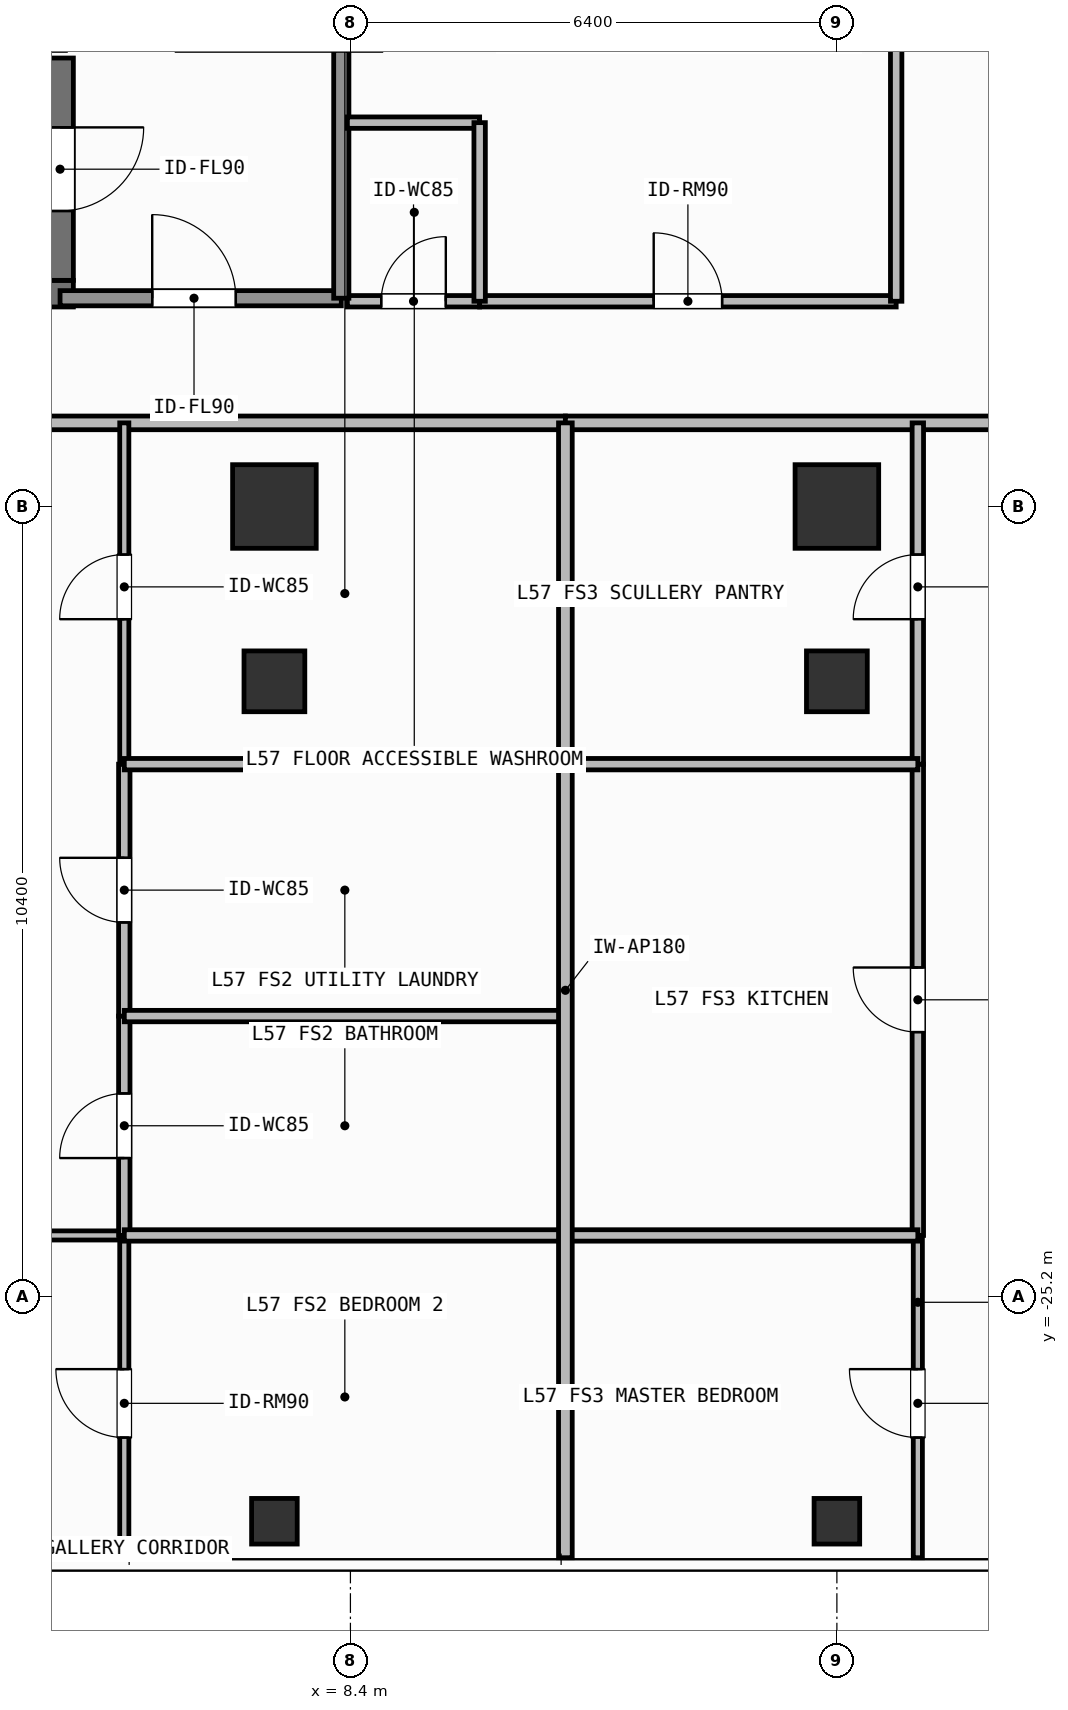
"""IFC4 building model, lengths in metres.
Left out: names, types, materials, properties, quantities, classifications, styles, units other than length and angle.
Written with IfcOpenShell. Run it as: python <this file> out.ifc"""

import sys

from ifc_helpers import new_model, si_unit, direction, frame, frame_2d, origin, origin_2d, place, context, subcontext, project, spatial, rectangle, hollow_rectangle, extrude, element, fill, save


model = new_model("IFC4")
c1 = context("Model", 3, precision=1e-05, world=origin(), true_north=direction((0.0, 1.0)))
c2 = subcontext(c1, "Body", "Model", "MODEL_VIEW")
j1 = project(units=[si_unit("LENGTHUNIT", "METRE"), si_unit("PLANEANGLEUNIT", "RADIAN")], contexts=[c1])
p1 = place(None, origin())
s1 = spatial("IfcSite", under=j1, at=p1, CompositionType="ELEMENT")
p2 = place(p1, origin())
s2 = spatial("IfcBuilding", under=s1, at=p2, CompositionType="ELEMENT")
p3 = place(p2, frame((0.0, 0.0, 231.3)))
s3 = spatial("IfcBuildingStorey", under=s2, at=p3, CompositionType="ELEMENT", Elevation=231.3)
p4 = place(p3, frame((-2.555, -12.0, 0.0), z_axis=(0.0, 0.0, 1.0), x_axis=(1.0, 0.0, 0.0)))
e1 = element("IfcWall", 1, at=p4, inside=s3, PredefinedType="SHEAR", context=c2, shape_type="SweptSolid", body=[
    extrude(rectangle(XDim=7.31, YDim=0.35, at=frame_2d((3.655, 0.0))), origin(), (0.0, 0.0, 1.0), 3.9),
])
p5 = place(p3, frame((4.58, -8.9, 0.0), z_axis=(0.0, 0.0, 1.0), x_axis=(0.0, -1.0, 0.0)))
e2 = element("IfcWall", 2, at=p5, inside=s3, PredefinedType="SHEAR", context=c2, shape_type="SweptSolid", body=[
    extrude(rectangle(XDim=2.925, YDim=0.35, at=frame_2d((1.462, 0.0))), origin(), (0.0, 0.0, 1.0), 3.9),
])
p6 = place(p5, frame((0.913, 0.0, 0.0)))
e3 = element("IfcOpeningElement", 3, at=p6, cuts=e2, PredefinedType="OPENING", context=c2, shape_type="SweptSolid", body=[
    extrude(rectangle(XDim=1.1, YDim=2.15, at=frame_2d((0.55, 1.075))), frame((0.0, 0.185, 0.0), z_axis=(0.0, -1.0, 0.0), x_axis=(1.0, 0.0, 0.0)), (0.0, 0.0, 1.0), 0.37),
])
for number, where, z_axis, x_axis in (
    (4, (7.4, -14.8, 0.0), (0.0, 0.0, 1.0), (1.0, 0.0, 0.0)),
    (5, (14.8, -14.8, 0.0), (0.0, 0.0, 1.0), (1.0, 0.0, 0.0)),
):
    element("IfcColumn", number, at=place(p3, frame(where, z_axis=z_axis, x_axis=x_axis)), inside=s3, PredefinedType="COLUMN", context=c2, shape_type="SweptSolid", body=[
        extrude(rectangle(XDim=1.1, YDim=1.1, at=origin_2d()), origin(), (0.0, 0.0, 1.0), 3.9),
    ])
for number, where, z_axis, x_axis in (
    (6, (7.4, -17.1, 0.0), (0.0, 0.0, 1.0), (1.0, 0.0, 0.0)),
    (7, (14.8, -17.1, 0.0), (0.0, 0.0, 1.0), (1.0, 0.0, 0.0)),
):
    element("IfcColumn", number, at=place(p3, frame(where, z_axis=z_axis, x_axis=x_axis)), inside=s3, PredefinedType="COLUMN", context=c2, shape_type="SweptSolid", body=[
        extrude(hollow_rectangle(XDim=0.8, YDim=0.8, WallThickness=0.036, at=origin_2d()), origin(), (0.0, 0.0, 1.0), 3.9),
    ])
for number, where, z_axis, x_axis in (
    (8, (7.4, -28.15, 0.0), (0.0, 0.0, 1.0), (1.0, 0.0, 0.0)),
    (9, (14.8, -28.15, 0.0), (0.0, 0.0, 1.0), (1.0, 0.0, 0.0)),
):
    element("IfcColumn", number, at=place(p3, frame(where, z_axis=z_axis, x_axis=x_axis)), inside=s3, PredefinedType="COLUMN", context=c2, shape_type="SweptSolid", body=[
        extrude(hollow_rectangle(XDim=0.6, YDim=0.6, WallThickness=0.028, at=origin_2d()), origin(), (0.0, 0.0, 1.0), 3.9),
    ])
p7 = place(p3, frame((4.58, -12.06, 0.0), z_axis=(0.0, 0.0, 1.0), x_axis=(1.0, 0.0, 0.0)))
e10 = element("IfcWall", 10, at=p7, inside=s3, PredefinedType="SOLIDWALL", context=c2, shape_type="SweptSolid", body=[
    extrude(rectangle(XDim=3.7, YDim=0.2, at=frame_2d((1.85, 0.0))), origin(), (0.0, 0.0, 1.0), 3.6),
])
p8 = place(p7, frame((1.212, 0.0, 0.0)))
e11 = element("IfcOpeningElement", 11, at=p8, cuts=e10, PredefinedType="OPENING", context=c2, shape_type="SweptSolid", body=[
    extrude(rectangle(XDim=1.1, YDim=2.15, at=frame_2d((0.55, 1.075))), frame((0.0, 0.11, 0.0), z_axis=(0.0, -1.0, 0.0), x_axis=(1.0, 0.0, 0.0)), (0.0, 0.0, 1.0), 0.22),
])
p9 = place(p3, frame((8.36, -12.1, 0.0), z_axis=(0.0, 0.0, 1.0), x_axis=(1.0, 0.0, 0.0)))
e12 = element("IfcWall", 12, at=p9, inside=s3, PredefinedType="PARTITIONING", context=c2, shape_type="SweptSolid", body=[
    extrude(rectangle(XDim=1.74, YDim=0.15, at=frame_2d((0.87, 0.0))), origin(), (0.0, 0.0, 1.0), 3.6),
])
p10 = place(p9, frame((0.445, 0.0, 0.0)))
e13 = element("IfcOpeningElement", 13, at=p10, cuts=e12, PredefinedType="OPENING", context=c2, shape_type="SweptSolid", body=[
    extrude(rectangle(XDim=0.85, YDim=2.1, at=frame_2d((0.425, 1.05))), frame((0.0, 0.085, 0.0), z_axis=(0.0, -1.0, 0.0), x_axis=(1.0, 0.0, 0.0)), (0.0, 0.0, 1.0), 0.17),
])
p11 = place(p3, frame((10.1, -12.1, 0.0), z_axis=(0.0, 0.0, 1.0), x_axis=(1.0, 0.0, 0.0)))
e14 = element("IfcWall", 14, at=p11, inside=s3, PredefinedType="PARTITIONING", context=c2, shape_type="SweptSolid", body=[
    extrude(rectangle(XDim=5.48, YDim=0.15, at=frame_2d((2.74, 0.0))), origin(), (0.0, 0.0, 1.0), 3.6),
])
p12 = place(p11, frame((2.29, 0.0, 0.0)))
e15 = element("IfcOpeningElement", 15, at=p12, cuts=e14, PredefinedType="OPENING", context=c2, shape_type="SweptSolid", body=[
    extrude(rectangle(XDim=0.9, YDim=2.1, at=frame_2d((0.45, 1.05))), frame((0.0, 0.085, 0.0), z_axis=(0.0, -1.0, 0.0), x_axis=(1.0, 0.0, 0.0)), (0.0, 0.0, 1.0), 0.17),
])
p13 = place(p3, frame((-4.677, -13.7, 0.0), z_axis=(0.0, 0.0, 1.0), x_axis=(1.0, 0.0, 0.0)))
e16 = element("IfcWall", 16, at=p13, inside=s3, PredefinedType="PARTITIONING", context=c2, shape_type="SweptSolid", body=[
    extrude(rectangle(XDim=15.905, YDim=0.18, at=frame_2d((7.953, 0.0))), origin(), (0.0, 0.0, 1.0), 3.6),
])
p14 = place(p13, frame((6.03, 0.0, 0.0)))
e17 = element("IfcOpeningElement", 17, at=p14, cuts=e16, PredefinedType="OPENING", context=c2, shape_type="SweptSolid", body=[
    extrude(rectangle(XDim=1.0, YDim=2.2, at=frame_2d((0.5, 1.1))), frame((0.0, 0.1, 0.0), z_axis=(0.0, -1.0, 0.0), x_axis=(1.0, 0.0, 0.0)), (0.0, 0.0, 1.0), 0.2),
])
p15 = place(p3, frame((-1.827, -24.39, 0.0), z_axis=(0.0, 0.0, 1.0), x_axis=(1.0, 0.0, 0.0)))
e18 = element("IfcWall", 18, at=p15, inside=s3, PredefinedType="PARTITIONING", context=c2, shape_type="SweptSolid", body=[
    extrude(rectangle(XDim=7.252, YDim=0.12, at=frame_2d((3.626, 0.0))), origin(), (0.0, 0.0, 1.0), 3.6),
])
p16 = place(p15, frame((3.176, 0.0, 0.0)))
e19 = element("IfcOpeningElement", 19, at=p16, cuts=e18, PredefinedType="OPENING", context=c2, shape_type="SweptSolid", body=[
    extrude(rectangle(XDim=0.9, YDim=2.1, at=frame_2d((0.45, 1.05))), frame((0.0, 0.07, 0.0), z_axis=(0.0, -1.0, 0.0), x_axis=(1.0, 0.0, 0.0)), (0.0, 0.0, 1.0), 0.14),
])
p17 = place(p3, frame((5.425, -24.39, 0.0), z_axis=(0.0, 0.0, 1.0), x_axis=(0.0, 1.0, 0.0)))
e20 = element("IfcWall", 20, at=p17, inside=s3, PredefinedType="PARTITIONING", context=c2, shape_type="SweptSolid", body=[
    extrude(rectangle(XDim=2.886, YDim=0.15, at=frame_2d((1.443, 0.0))), origin(), (0.0, 0.0, 1.0), 3.6),
])
p18 = place(p17, frame((1.018, 0.0, 0.0)))
e21 = element("IfcOpeningElement", 21, at=p18, cuts=e20, PredefinedType="OPENING", context=c2, shape_type="SweptSolid", body=[
    extrude(rectangle(XDim=0.85, YDim=2.1, at=frame_2d((0.425, 1.05))), frame((0.0, 0.085, 0.0), z_axis=(0.0, -1.0, 0.0), x_axis=(1.0, 0.0, 0.0)), (0.0, 0.0, 1.0), 0.17),
])
p19 = place(p3, frame((5.425, -21.504, 0.0), z_axis=(0.0, 0.0, 1.0), x_axis=(0.0, 1.0, 0.0)))
e22 = element("IfcWall", 22, at=p19, inside=s3, PredefinedType="PARTITIONING", context=c2, shape_type="SweptSolid", body=[
    extrude(rectangle(XDim=3.314, YDim=0.15, at=frame_2d((1.657, 0.0))), origin(), (0.0, 0.0, 1.0), 3.6),
])
p20 = place(p19, frame((1.232, 0.0, 0.0)))
e23 = element("IfcOpeningElement", 23, at=p20, cuts=e22, PredefinedType="OPENING", context=c2, shape_type="SweptSolid", body=[
    extrude(rectangle(XDim=0.85, YDim=2.1, at=frame_2d((0.425, 1.05))), frame((0.0, 0.085, 0.0), z_axis=(0.0, -1.0, 0.0), x_axis=(1.0, 0.0, 0.0)), (0.0, 0.0, 1.0), 0.17),
])
p21 = place(p3, frame((5.425, -18.19, 0.0), z_axis=(0.0, 0.0, 1.0), x_axis=(0.0, 1.0, 0.0)))
e24 = element("IfcWall", 24, at=p21, inside=s3, PredefinedType="PARTITIONING", context=c2, shape_type="SweptSolid", body=[
    extrude(rectangle(XDim=4.49, YDim=0.12, at=frame_2d((2.245, 0.0))), origin(), (0.0, 0.0, 1.0), 3.6),
])
p22 = place(p21, frame((1.907, 0.0, 0.0)))
e25 = element("IfcOpeningElement", 25, at=p22, cuts=e24, PredefinedType="OPENING", context=c2, shape_type="SweptSolid", body=[
    extrude(rectangle(XDim=0.85, YDim=2.1, at=frame_2d((0.425, 1.05))), frame((0.0, 0.07, 0.0), z_axis=(0.0, -1.0, 0.0), x_axis=(1.0, 0.0, 0.0)), (0.0, 0.0, 1.0), 0.14),
])
p23 = place(p3, frame((5.425, -28.63, 0.0), z_axis=(0.0, 0.0, 1.0), x_axis=(0.0, 1.0, 0.0)))
e26 = element("IfcWall", 26, at=p23, inside=s3, PredefinedType="PARTITIONING", context=c2, shape_type="SweptSolid", body=[
    extrude(rectangle(XDim=4.24, YDim=0.12, at=frame_2d((2.12, 0.0))), origin(), (0.0, 0.0, 1.0), 3.6),
])
p24 = place(p23, frame((1.581, 0.0, 0.0)))
e27 = element("IfcOpeningElement", 27, at=p24, cuts=e26, PredefinedType="OPENING", context=c2, shape_type="SweptSolid", body=[
    extrude(rectangle(XDim=0.9, YDim=2.1, at=frame_2d((0.45, 1.05))), frame((0.0, 0.07, 0.0), z_axis=(0.0, -1.0, 0.0), x_axis=(1.0, 0.0, 0.0)), (0.0, 0.0, 1.0), 0.14),
])
p25 = place(p3, frame((11.228, -13.7, 0.0), z_axis=(0.0, 0.0, 1.0), x_axis=(1.0, 0.0, 0.0)))
e28 = element("IfcWall", 28, at=p25, inside=s3, PredefinedType="PARTITIONING", context=c2, shape_type="SweptSolid", body=[
    extrude(rectangle(XDim=11.592, YDim=0.18, at=frame_2d((5.796, 0.0))), origin(), (0.0, 0.0, 1.0), 3.6),
])
p26 = place(p25, frame((6.004, 0.0, 0.0)))
e29 = element("IfcOpeningElement", 29, at=p26, cuts=e28, PredefinedType="OPENING", context=c2, shape_type="SweptSolid", body=[
    extrude(rectangle(XDim=1.0, YDim=2.2, at=frame_2d((0.5, 1.1))), frame((0.0, 0.1, 0.0), z_axis=(0.0, -1.0, 0.0), x_axis=(1.0, 0.0, 0.0)), (0.0, 0.0, 1.0), 0.2),
])
p27 = place(p3, frame((15.865, -24.39, 0.0), z_axis=(0.0, 0.0, 1.0), x_axis=(0.0, 1.0, 0.0)))
e30 = element("IfcWall", 30, at=p27, inside=s3, PredefinedType="PARTITIONING", context=c2, shape_type="SweptSolid", body=[
    extrude(rectangle(XDim=6.2, YDim=0.15, at=frame_2d((3.1, 0.0))), origin(), (0.0, 0.0, 1.0), 3.6),
])
p28 = place(p27, frame((2.675, 0.0, 0.0)))
e31 = element("IfcOpeningElement", 31, at=p28, cuts=e30, PredefinedType="OPENING", context=c2, shape_type="SweptSolid", body=[
    extrude(rectangle(XDim=0.85, YDim=2.1, at=frame_2d((0.425, 1.05))), frame((0.0, 0.085, 0.0), z_axis=(0.0, -1.0, 0.0), x_axis=(1.0, 0.0, 0.0)), (0.0, 0.0, 1.0), 0.17),
])
p29 = place(p3, frame((15.865, -18.19, 0.0), z_axis=(0.0, 0.0, 1.0), x_axis=(0.0, 1.0, 0.0)))
e32 = element("IfcWall", 32, at=p29, inside=s3, PredefinedType="PARTITIONING", context=c2, shape_type="SweptSolid", body=[
    extrude(rectangle(XDim=4.49, YDim=0.15, at=frame_2d((2.245, 0.0))), origin(), (0.0, 0.0, 1.0), 3.6),
])
p30 = place(p29, frame((1.907, 0.0, 0.0)))
e33 = element("IfcOpeningElement", 33, at=p30, cuts=e32, PredefinedType="OPENING", context=c2, shape_type="SweptSolid", body=[
    extrude(rectangle(XDim=0.85, YDim=2.1, at=frame_2d((0.425, 1.05))), frame((0.0, 0.085, 0.0), z_axis=(0.0, -1.0, 0.0), x_axis=(1.0, 0.0, 0.0)), (0.0, 0.0, 1.0), 0.17),
])
p31 = place(p3, frame((15.865, -28.63, 0.0), z_axis=(0.0, 0.0, 1.0), x_axis=(0.0, 1.0, 0.0)))
e34 = element("IfcWall", 34, at=p31, inside=s3, PredefinedType="PARTITIONING", context=c2, shape_type="SweptSolid", body=[
    extrude(rectangle(XDim=4.24, YDim=0.12, at=frame_2d((2.12, 0.0))), origin(), (0.0, 0.0, 1.0), 3.6),
])
p32 = place(p31, frame((1.581, 0.0, 0.0)))
e35 = element("IfcOpeningElement", 35, at=p32, cuts=e34, PredefinedType="OPENING", context=c2, shape_type="SweptSolid", body=[
    extrude(rectangle(XDim=0.9, YDim=2.1, at=frame_2d((0.45, 1.05))), frame((0.0, 0.07, 0.0), z_axis=(0.0, -1.0, 0.0), x_axis=(1.0, 0.0, 0.0)), (0.0, 0.0, 1.0), 0.14),
])
p33 = place(p3, frame((8.28, -12.06, 0.0), z_axis=(0.0, 0.0, 1.0), x_axis=(0.0, 1.0, 0.0)))
e36 = element("IfcWall", 36, at=p33, inside=s3, PredefinedType="SOLIDWALL", context=c2, shape_type="SweptSolid", body=[
    extrude(rectangle(XDim=3.26, YDim=0.2, at=frame_2d((1.63, 0.0))), origin(), (0.0, 0.0, 1.0), 3.6),
])
p34 = place(p3, frame((8.36, -9.75, 0.0), z_axis=(0.0, 0.0, 1.0), x_axis=(1.0, 0.0, 0.0)))
e37 = element("IfcWall", 37, at=p34, inside=s3, PredefinedType="PARTITIONING", context=c2, shape_type="SweptSolid", body=[
    extrude(rectangle(XDim=1.74, YDim=0.15, at=frame_2d((0.87, 0.0))), origin(), (0.0, 0.0, 1.0), 3.6),
])
p35 = place(p3, frame((10.1, -12.1, 0.0), z_axis=(0.0, 0.0, 1.0), x_axis=(0.0, 1.0, 0.0)))
e38 = element("IfcWall", 38, at=p35, inside=s3, PredefinedType="PARTITIONING", context=c2, shape_type="SweptSolid", body=[
    extrude(rectangle(XDim=2.35, YDim=0.15, at=frame_2d((1.175, 0.0))), origin(), (0.0, 0.0, 1.0), 3.6),
])
p36 = place(p3, frame((15.58, -12.1, 0.0), z_axis=(0.0, 0.0, 1.0), x_axis=(0.0, 1.0, 0.0)))
e39 = element("IfcWall", 39, at=p36, inside=s3, PredefinedType="PARTITIONING", context=c2, shape_type="SweptSolid", body=[
    extrude(rectangle(XDim=6.25, YDim=0.15, at=frame_2d((3.125, 0.0))), origin(), (0.0, 0.0, 1.0), 3.6),
])
for number, where, z_axis, x_axis in (
    (40, (5.425, -21.504, 0.0), (0.0, 0.0, 1.0), (1.0, 0.0, 0.0)),
    (41, (5.425, -18.19, 0.0), (0.0, 0.0, 1.0), (1.0, 0.0, 0.0)),
    (42, (5.425, -24.39, 0.0), (0.0, 0.0, 1.0), (1.0, 0.0, 0.0)),
):
    element("IfcWall", number, at=place(p3, frame(where, z_axis=z_axis, x_axis=x_axis)), inside=s3, PredefinedType="PARTITIONING", context=c2, shape_type="SweptSolid", body=[
        extrude(rectangle(XDim=5.803, YDim=0.15, at=frame_2d((2.901, 0.0))), origin(), (0.0, 0.0, 1.0), 3.6),
    ])
for number, where, z_axis, x_axis in (
    (43, (11.228, -18.19, 0.0), (0.0, 0.0, 1.0), (1.0, 0.0, 0.0)),
    (44, (11.228, -24.39, 0.0), (0.0, 0.0, 1.0), (1.0, 0.0, 0.0)),
):
    element("IfcWall", number, at=place(p3, frame(where, z_axis=z_axis, x_axis=x_axis)), inside=s3, PredefinedType="PARTITIONING", context=c2, shape_type="SweptSolid", body=[
        extrude(rectangle(XDim=4.637, YDim=0.15, at=frame_2d((2.318, 0.0))), origin(), (0.0, 0.0, 1.0), 3.6),
    ])
p37 = place(p3, frame((11.228, -28.63, 0.0), z_axis=(0.0, 0.0, 1.0), x_axis=(0.0, 1.0, 0.0)))
e45 = element("IfcWall", 45, at=p37, inside=s3, PredefinedType="PARTITIONING", context=c2, shape_type="SweptSolid", body=[
    extrude(rectangle(XDim=14.93, YDim=0.18, at=frame_2d((7.465, 0.0))), origin(), (0.0, 0.0, 1.0), 3.34),
])
p38 = place(p6, origin())
e46 = element("IfcDoor", 46, at=p38, inside=s3, OperationType="SINGLE_SWING_LEFT", PredefinedType="DOOR", context=c2, shape_type="SweptSolid", body=[
    extrude(rectangle(XDim=1.1, YDim=2.15, at=frame_2d((0.55, 1.075))), frame((0.0, 0.025, 0.0), z_axis=(0.0, -1.0, 0.0), x_axis=(1.0, 0.0, 0.0)), (0.0, 0.0, 1.0), 0.05),
])
fill(e3, e46)
p39 = place(p8, origin())
e47 = element("IfcDoor", 47, at=p39, inside=s3, OperationType="SINGLE_SWING_LEFT", PredefinedType="DOOR", context=c2, shape_type="SweptSolid", body=[
    extrude(rectangle(XDim=1.1, YDim=2.15, at=frame_2d((0.55, 1.075))), frame((0.0, 0.025, 0.0), z_axis=(0.0, -1.0, 0.0), x_axis=(1.0, 0.0, 0.0)), (0.0, 0.0, 1.0), 0.05),
])
fill(e11, e47)
p40 = place(p10, origin())
e48 = element("IfcDoor", 48, at=p40, inside=s3, OperationType="SINGLE_SWING_RIGHT", PredefinedType="DOOR", context=c2, shape_type="SweptSolid", body=[
    extrude(rectangle(XDim=0.85, YDim=2.1, at=frame_2d((0.425, 1.05))), frame((0.0, 0.025, 0.0), z_axis=(0.0, -1.0, 0.0), x_axis=(1.0, 0.0, 0.0)), (0.0, 0.0, 1.0), 0.05),
])
fill(e13, e48)
p41 = place(p12, origin())
e49 = element("IfcDoor", 49, at=p41, inside=s3, OperationType="SINGLE_SWING_LEFT", PredefinedType="DOOR", context=c2, shape_type="SweptSolid", body=[
    extrude(rectangle(XDim=0.9, YDim=2.1, at=frame_2d((0.45, 1.05))), frame((0.0, 0.025, 0.0), z_axis=(0.0, -1.0, 0.0), x_axis=(1.0, 0.0, 0.0)), (0.0, 0.0, 1.0), 0.05),
])
fill(e15, e49)
p42 = place(p18, origin())
e50 = element("IfcDoor", 50, at=p42, inside=s3, OperationType="SINGLE_SWING_LEFT", PredefinedType="DOOR", context=c2, shape_type="SweptSolid", body=[
    extrude(rectangle(XDim=0.85, YDim=2.1, at=frame_2d((0.425, 1.05))), frame((0.0, 0.025, 0.0), z_axis=(0.0, -1.0, 0.0), x_axis=(1.0, 0.0, 0.0)), (0.0, 0.0, 1.0), 0.05),
])
fill(e21, e50)
p43 = place(p20, origin())
e51 = element("IfcDoor", 51, at=p43, inside=s3, OperationType="SINGLE_SWING_RIGHT", PredefinedType="DOOR", context=c2, shape_type="SweptSolid", body=[
    extrude(rectangle(XDim=0.85, YDim=2.1, at=frame_2d((0.425, 1.05))), frame((0.0, 0.025, 0.0), z_axis=(0.0, -1.0, 0.0), x_axis=(1.0, 0.0, 0.0)), (0.0, 0.0, 1.0), 0.05),
])
fill(e23, e51)
p44 = place(p22, origin())
e52 = element("IfcDoor", 52, at=p44, inside=s3, OperationType="SINGLE_SWING_LEFT", PredefinedType="DOOR", context=c2, shape_type="SweptSolid", body=[
    extrude(rectangle(XDim=0.85, YDim=2.1, at=frame_2d((0.425, 1.05))), frame((0.0, 0.025, 0.0), z_axis=(0.0, -1.0, 0.0), x_axis=(1.0, 0.0, 0.0)), (0.0, 0.0, 1.0), 0.05),
])
fill(e25, e52)
p45 = place(p24, origin())
e53 = element("IfcDoor", 53, at=p45, inside=s3, OperationType="SINGLE_SWING_RIGHT", PredefinedType="DOOR", context=c2, shape_type="SweptSolid", body=[
    extrude(rectangle(XDim=0.9, YDim=2.1, at=frame_2d((0.45, 1.05))), frame((0.0, 0.025, 0.0), z_axis=(0.0, -1.0, 0.0), x_axis=(1.0, 0.0, 0.0)), (0.0, 0.0, 1.0), 0.05),
])
fill(e27, e53)
p46 = place(p28, origin())
e54 = element("IfcDoor", 54, at=p46, inside=s3, OperationType="SINGLE_SWING_RIGHT", PredefinedType="DOOR", context=c2, shape_type="SweptSolid", body=[
    extrude(rectangle(XDim=0.85, YDim=2.1, at=frame_2d((0.425, 1.05))), frame((0.0, 0.025, 0.0), z_axis=(0.0, -1.0, 0.0), x_axis=(1.0, 0.0, 0.0)), (0.0, 0.0, 1.0), 0.05),
])
fill(e31, e54)
p47 = place(p30, origin())
e55 = element("IfcDoor", 55, at=p47, inside=s3, OperationType="SINGLE_SWING_LEFT", PredefinedType="DOOR", context=c2, shape_type="SweptSolid", body=[
    extrude(rectangle(XDim=0.85, YDim=2.1, at=frame_2d((0.425, 1.05))), frame((0.0, 0.025, 0.0), z_axis=(0.0, -1.0, 0.0), x_axis=(1.0, 0.0, 0.0)), (0.0, 0.0, 1.0), 0.05),
])
fill(e33, e55)
p48 = place(p32, origin())
e56 = element("IfcDoor", 56, at=p48, inside=s3, OperationType="SINGLE_SWING_RIGHT", PredefinedType="DOOR", context=c2, shape_type="SweptSolid", body=[
    extrude(rectangle(XDim=0.9, YDim=2.1, at=frame_2d((0.45, 1.05))), frame((0.0, 0.025, 0.0), z_axis=(0.0, -1.0, 0.0), x_axis=(1.0, 0.0, 0.0)), (0.0, 0.0, 1.0), 0.05),
])
fill(e35, e56)
save(model, sys.argv[1])
